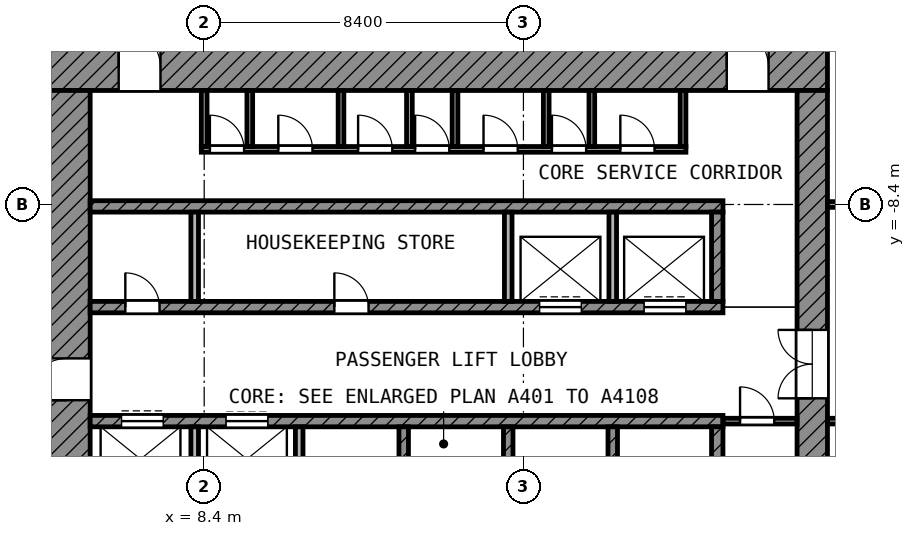
"""IFC4 building model, lengths in metres.
Left out: names, types, materials, properties, quantities, classifications, styles, units other than length and angle.
Written with IfcOpenShell. Run it as: python <this file> out.ifc"""

import sys

from ifc_helpers import new_model, si_unit, direction, frame, frame_2d, origin, place, context, subcontext, project, spatial, rectangle, extrude, element, fill, save


model = new_model("IFC4")
c1 = context("Model", 3, precision=1e-05, world=origin(), true_north=direction((0.0, 1.0)))
c2 = subcontext(c1, "Body", "Model", "MODEL_VIEW")
j1 = project(units=[si_unit("LENGTHUNIT", "METRE"), si_unit("PLANEANGLEUNIT", "RADIAN")], contexts=[c1])
p1 = place(None, origin())
s1 = spatial("IfcSite", under=j1, at=p1, CompositionType="ELEMENT")
p2 = place(p1, origin())
s2 = spatial("IfcBuilding", under=s1, at=p2, CompositionType="ELEMENT")
p3 = place(p2, frame((0.0, 0.0, 260.0)))
s3 = spatial("IfcBuildingStorey", under=s2, at=p3, CompositionType="ELEMENT", Elevation=260.0)
p4 = place(p3, frame((4.2, -4.8, 0.0), z_axis=(0.0, 0.0, 1.0), x_axis=(1.0, 0.0, 0.0)))
e1 = element("IfcWall", 1, at=p4, inside=s3, PredefinedType="SHEAR", context=c2, shape_type="SweptSolid", body=[
    extrude(rectangle(XDim=20.6, YDim=1.2, at=frame_2d((10.3, 0.0))), origin(), (0.0, 0.0, 1.0), 3.6),
])
p5 = place(p4, frame((1.95, 0.0, 0.0)))
e2 = element("IfcOpeningElement", 2, at=p5, cuts=e1, PredefinedType="OPENING", context=c2, shape_type="SweptSolid", body=[
    extrude(rectangle(XDim=1.1, YDim=2.1, at=frame_2d((0.55, 1.05))), frame((0.0, 0.61, 0.0), z_axis=(0.0, -1.0, 0.0), x_axis=(1.0, 0.0, 0.0)), (0.0, 0.0, 1.0), 1.22),
])
p6 = place(p4, frame((17.95, 0.0, 0.0)))
e3 = element("IfcOpeningElement", 3, at=p6, cuts=e1, PredefinedType="OPENING", context=c2, shape_type="SweptSolid", body=[
    extrude(rectangle(XDim=1.1, YDim=2.1, at=frame_2d((0.55, 1.05))), frame((0.0, 0.61, 0.0), z_axis=(0.0, -1.0, 0.0), x_axis=(1.0, 0.0, 0.0)), (0.0, 0.0, 1.0), 1.22),
])
p7 = place(p3, frame((4.8, -24.8, 0.0), z_axis=(0.0, 0.0, 1.0), x_axis=(0.0, 1.0, 0.0)))
e4 = element("IfcWall", 4, at=p7, inside=s3, PredefinedType="SHEAR", context=c2, shape_type="SweptSolid", body=[
    extrude(rectangle(XDim=19.4, YDim=1.2, at=frame_2d((9.7, 0.0))), origin(), (0.0, 0.0, 1.0), 3.6),
])
p8 = place(p7, frame((11.25, 0.0, 0.0)))
e5 = element("IfcOpeningElement", 5, at=p8, cuts=e4, PredefinedType="OPENING", context=c2, shape_type="SweptSolid", body=[
    extrude(rectangle(XDim=1.1, YDim=2.1, at=frame_2d((0.55, 1.05))), frame((0.0, 0.61, 0.0), z_axis=(0.0, -1.0, 0.0), x_axis=(1.0, 0.0, 0.0)), (0.0, 0.0, 1.0), 1.22),
])
p9 = place(p7, frame((1.95, 0.0, 0.0)))
e6 = element("IfcOpeningElement", 6, at=p9, cuts=e4, PredefinedType="OPENING", context=c2, shape_type="SweptSolid", body=[
    extrude(rectangle(XDim=1.1, YDim=2.1, at=frame_2d((0.55, 1.05))), frame((0.0, 0.61, 0.0), z_axis=(0.0, -1.0, 0.0), x_axis=(1.0, 0.0, 0.0)), (0.0, 0.0, 1.0), 1.22),
])
p10 = place(p3, frame((24.4, -24.0, 0.0), z_axis=(0.0, 0.0, 1.0), x_axis=(0.0, 1.0, 0.0)))
e7 = element("IfcWall", 7, at=p10, inside=s3, PredefinedType="SHEAR", context=c2, shape_type="SweptSolid", body=[
    extrude(rectangle(XDim=18.6, YDim=0.8, at=frame_2d((9.3, 0.0))), origin(), (0.0, 0.0, 1.0), 3.6),
])
p11 = place(p10, frame((10.5, 0.0, 0.0)))
e8 = element("IfcOpeningElement", 8, at=p11, cuts=e7, PredefinedType="OPENING", context=c2, shape_type="SweptSolid", body=[
    extrude(rectangle(XDim=1.8, YDim=2.1, at=frame_2d((0.9, 1.05))), frame((0.0, 0.41, 0.0), z_axis=(0.0, -1.0, 0.0), x_axis=(1.0, 0.0, 0.0)), (0.0, 0.0, 1.0), 0.82),
])
p12 = place(p3, frame((5.4, -8.45, 0.0), z_axis=(0.0, 0.0, 1.0), x_axis=(1.0, 0.0, 0.0)))
e9 = element("IfcWall", 9, at=p12, inside=s3, PredefinedType="SHEAR", context=c2, shape_type="SweptSolid", body=[
    extrude(rectangle(XDim=16.65, YDim=0.3, at=frame_2d((8.325, 0.0))), origin(), (0.0, 0.0, 1.0), 3.6),
])
p13 = place(p3, frame((5.4, -11.1, 0.0), z_axis=(0.0, 0.0, 1.0), x_axis=(1.0, 0.0, 0.0)))
e10 = element("IfcWall", 10, at=p13, inside=s3, PredefinedType="SHEAR", context=c2, shape_type="SweptSolid", body=[
    extrude(rectangle(XDim=16.65, YDim=0.3, at=frame_2d((8.325, 0.0))), origin(), (0.0, 0.0, 1.0), 3.6),
])
p14 = place(p13, frame((11.825, 0.0, 0.0)))
e11 = element("IfcOpeningElement", 11, at=p14, cuts=e10, PredefinedType="OPENING", context=c2, shape_type="SweptSolid", body=[
    extrude(rectangle(XDim=1.1, YDim=2.1, at=frame_2d((0.55, 1.05))), frame((0.0, 0.16, 0.0), z_axis=(0.0, -1.0, 0.0), x_axis=(1.0, 0.0, 0.0)), (0.0, 0.0, 1.0), 0.32),
])
p15 = place(p13, frame((14.575, 0.0, 0.0)))
e12 = element("IfcOpeningElement", 12, at=p15, cuts=e10, PredefinedType="OPENING", context=c2, shape_type="SweptSolid", body=[
    extrude(rectangle(XDim=1.1, YDim=2.1, at=frame_2d((0.55, 1.05))), frame((0.0, 0.16, 0.0), z_axis=(0.0, -1.0, 0.0), x_axis=(1.0, 0.0, 0.0)), (0.0, 0.0, 1.0), 0.32),
])
p16 = place(p13, frame((0.925, 0.0, 0.0)))
e13 = element("IfcOpeningElement", 13, at=p16, cuts=e10, PredefinedType="OPENING", context=c2, shape_type="SweptSolid", body=[
    extrude(rectangle(XDim=0.9, YDim=2.1, at=frame_2d((0.45, 1.05))), frame((0.0, 0.16, 0.0), z_axis=(0.0, -1.0, 0.0), x_axis=(1.0, 0.0, 0.0)), (0.0, 0.0, 1.0), 0.32),
])
p17 = place(p13, frame((6.425, 0.0, 0.0)))
e14 = element("IfcOpeningElement", 14, at=p17, cuts=e10, PredefinedType="OPENING", context=c2, shape_type="SweptSolid", body=[
    extrude(rectangle(XDim=0.9, YDim=2.1, at=frame_2d((0.45, 1.05))), frame((0.0, 0.16, 0.0), z_axis=(0.0, -1.0, 0.0), x_axis=(1.0, 0.0, 0.0)), (0.0, 0.0, 1.0), 0.32),
])
p18 = place(p3, frame((5.4, -14.1, 0.0), z_axis=(0.0, 0.0, 1.0), x_axis=(1.0, 0.0, 0.0)))
e15 = element("IfcWall", 15, at=p18, inside=s3, PredefinedType="SHEAR", context=c2, shape_type="SweptSolid", body=[
    extrude(rectangle(XDim=16.65, YDim=0.3, at=frame_2d((8.325, 0.0))), origin(), (0.0, 0.0, 1.0), 3.6),
])
p19 = place(p18, frame((0.825, 0.0, 0.0)))
e16 = element("IfcOpeningElement", 16, at=p19, cuts=e15, PredefinedType="OPENING", context=c2, shape_type="SweptSolid", body=[
    extrude(rectangle(XDim=1.1, YDim=2.1, at=frame_2d((0.55, 1.05))), frame((0.0, 0.16, 0.0), z_axis=(0.0, -1.0, 0.0), x_axis=(1.0, 0.0, 0.0)), (0.0, 0.0, 1.0), 0.32),
])
p20 = place(p18, frame((3.575, 0.0, 0.0)))
e17 = element("IfcOpeningElement", 17, at=p20, cuts=e15, PredefinedType="OPENING", context=c2, shape_type="SweptSolid", body=[
    extrude(rectangle(XDim=1.1, YDim=2.1, at=frame_2d((0.55, 1.05))), frame((0.0, 0.16, 0.0), z_axis=(0.0, -1.0, 0.0), x_axis=(1.0, 0.0, 0.0)), (0.0, 0.0, 1.0), 0.32),
])
p21 = place(p3, frame((21.9, -10.95, 0.0), z_axis=(0.0, 0.0, 1.0), x_axis=(0.0, 1.0, 0.0)))
e18 = element("IfcWall", 18, at=p21, inside=s3, PredefinedType="SHEAR", context=c2, shape_type="SweptSolid", body=[
    extrude(rectangle(XDim=2.35, YDim=0.3, at=frame_2d((1.175, 0.0))), origin(), (0.0, 0.0, 1.0), 3.6),
])
p22 = place(p3, frame((21.9, -16.6, 0.0), z_axis=(0.0, 0.0, 1.0), x_axis=(0.0, 1.0, 0.0)))
e19 = element("IfcWall", 19, at=p22, inside=s3, PredefinedType="SHEAR", context=c2, shape_type="SweptSolid", body=[
    extrude(rectangle(XDim=2.35, YDim=0.3, at=frame_2d((1.175, 0.0))), origin(), (0.0, 0.0, 1.0), 3.6),
])
for number, where, z_axis, x_axis in (
    (20, (8.15, -10.95, 0.0), (0.0, 0.0, 1.0), (0.0, 1.0, 0.0)),
    (21, (16.4, -10.95, 0.0), (0.0, 0.0, 1.0), (0.0, 1.0, 0.0)),
    (22, (19.15, -10.95, 0.0), (0.0, 0.0, 1.0), (0.0, 1.0, 0.0)),
):
    element("IfcWall", number, at=place(p3, frame(where, z_axis=z_axis, x_axis=x_axis)), inside=s3, PredefinedType="PARTITIONING", context=c2, shape_type="SweptSolid", body=[
        extrude(rectangle(XDim=2.35, YDim=0.2, at=frame_2d((1.175, 0.0))), origin(), (0.0, 0.0, 1.0), 3.6),
    ])
for number, where, z_axis, x_axis in (
    (23, (8.15, -16.6, 0.0), (0.0, 0.0, 1.0), (0.0, 1.0, 0.0)),
    (24, (10.9, -16.6, 0.0), (0.0, 0.0, 1.0), (0.0, 1.0, 0.0)),
):
    element("IfcWall", number, at=place(p3, frame(where, z_axis=z_axis, x_axis=x_axis)), inside=s3, PredefinedType="PARTITIONING", context=c2, shape_type="SweptSolid", body=[
        extrude(rectangle(XDim=2.35, YDim=0.2, at=frame_2d((1.175, 0.0))), origin(), (0.0, 0.0, 1.0), 3.6),
    ])
for number, where, z_axis, x_axis in (
    (25, (13.65, -16.6, 0.0), (0.0, 0.0, 1.0), (0.0, 1.0, 0.0)),
    (26, (16.4, -16.6, 0.0), (0.0, 0.0, 1.0), (0.0, 1.0, 0.0)),
    (27, (19.15, -16.6, 0.0), (0.0, 0.0, 1.0), (0.0, 1.0, 0.0)),
):
    element("IfcWall", number, at=place(p3, frame(where, z_axis=z_axis, x_axis=x_axis)), inside=s3, PredefinedType="SHEAR", context=c2, shape_type="SweptSolid", body=[
        extrude(rectangle(XDim=2.35, YDim=0.25, at=frame_2d((1.175, 0.0))), origin(), (0.0, 0.0, 1.0), 3.6),
    ])
p23 = place(p3, frame((22.05, -14.1, 0.0), z_axis=(0.0, 0.0, 1.0), x_axis=(1.0, 0.0, 0.0)))
e28 = element("IfcWall", 28, at=p23, inside=s3, PredefinedType="PARTITIONING", context=c2, shape_type="SweptSolid", body=[
    extrude(rectangle(XDim=1.95, YDim=0.15, at=frame_2d((0.975, 0.0))), origin(), (0.0, 0.0, 1.0), 3.6),
])
p24 = place(p23, frame((0.45, 0.0, 0.0)))
e29 = element("IfcOpeningElement", 29, at=p24, cuts=e28, PredefinedType="OPENING", context=c2, shape_type="SweptSolid", body=[
    extrude(rectangle(XDim=0.9, YDim=2.1, at=frame_2d((0.45, 1.05))), frame((0.0, 0.085, 0.0), z_axis=(0.0, -1.0, 0.0), x_axis=(1.0, 0.0, 0.0)), (0.0, 0.0, 1.0), 0.17),
])
p25 = place(p3, frame((8.325, -6.95, 0.0), z_axis=(0.0, 0.0, 1.0), x_axis=(1.0, 0.0, 0.0)))
e30 = element("IfcWall", 30, at=p25, inside=s3, PredefinedType="PARTITIONING", context=c2, shape_type="SweptSolid", body=[
    extrude(rectangle(XDim=12.75, YDim=0.15, at=frame_2d((6.375, 0.0))), origin(), (0.0, 0.0, 1.0), 3.6),
])
p26 = place(p25, frame((0.225, 0.0, 0.0)))
e31 = element("IfcOpeningElement", 31, at=p26, cuts=e30, PredefinedType="OPENING", context=c2, shape_type="SweptSolid", body=[
    extrude(rectangle(XDim=0.9, YDim=2.1, at=frame_2d((0.45, 1.05))), frame((0.0, 0.085, 0.0), z_axis=(0.0, -1.0, 0.0), x_axis=(1.0, 0.0, 0.0)), (0.0, 0.0, 1.0), 0.17),
])
p27 = place(p25, frame((2.025, 0.0, 0.0)))
e32 = element("IfcOpeningElement", 32, at=p27, cuts=e30, PredefinedType="OPENING", context=c2, shape_type="SweptSolid", body=[
    extrude(rectangle(XDim=0.9, YDim=2.1, at=frame_2d((0.45, 1.05))), frame((0.0, 0.085, 0.0), z_axis=(0.0, -1.0, 0.0), x_axis=(1.0, 0.0, 0.0)), (0.0, 0.0, 1.0), 0.17),
])
p28 = place(p25, frame((4.125, 0.0, 0.0)))
e33 = element("IfcOpeningElement", 33, at=p28, cuts=e30, PredefinedType="OPENING", context=c2, shape_type="SweptSolid", body=[
    extrude(rectangle(XDim=0.9, YDim=2.1, at=frame_2d((0.45, 1.05))), frame((0.0, 0.085, 0.0), z_axis=(0.0, -1.0, 0.0), x_axis=(1.0, 0.0, 0.0)), (0.0, 0.0, 1.0), 0.17),
])
p29 = place(p25, frame((5.625, 0.0, 0.0)))
e34 = element("IfcOpeningElement", 34, at=p29, cuts=e30, PredefinedType="OPENING", context=c2, shape_type="SweptSolid", body=[
    extrude(rectangle(XDim=0.9, YDim=2.1, at=frame_2d((0.45, 1.05))), frame((0.0, 0.085, 0.0), z_axis=(0.0, -1.0, 0.0), x_axis=(1.0, 0.0, 0.0)), (0.0, 0.0, 1.0), 0.17),
])
p30 = place(p25, frame((7.425, 0.0, 0.0)))
e35 = element("IfcOpeningElement", 35, at=p30, cuts=e30, PredefinedType="OPENING", context=c2, shape_type="SweptSolid", body=[
    extrude(rectangle(XDim=0.9, YDim=2.1, at=frame_2d((0.45, 1.05))), frame((0.0, 0.085, 0.0), z_axis=(0.0, -1.0, 0.0), x_axis=(1.0, 0.0, 0.0)), (0.0, 0.0, 1.0), 0.17),
])
p31 = place(p25, frame((9.225, 0.0, 0.0)))
e36 = element("IfcOpeningElement", 36, at=p31, cuts=e30, PredefinedType="OPENING", context=c2, shape_type="SweptSolid", body=[
    extrude(rectangle(XDim=0.9, YDim=2.1, at=frame_2d((0.45, 1.05))), frame((0.0, 0.085, 0.0), z_axis=(0.0, -1.0, 0.0), x_axis=(1.0, 0.0, 0.0)), (0.0, 0.0, 1.0), 0.17),
])
p32 = place(p25, frame((11.025, 0.0, 0.0)))
e37 = element("IfcOpeningElement", 37, at=p32, cuts=e30, PredefinedType="OPENING", context=c2, shape_type="SweptSolid", body=[
    extrude(rectangle(XDim=0.9, YDim=2.1, at=frame_2d((0.45, 1.05))), frame((0.0, 0.085, 0.0), z_axis=(0.0, -1.0, 0.0), x_axis=(1.0, 0.0, 0.0)), (0.0, 0.0, 1.0), 0.17),
])
for number, where, z_axis, x_axis in (
    (38, (8.4, -6.875, 0.0), (0.0, 0.0, 1.0), (0.0, 1.0, 0.0)),
    (39, (9.6, -6.875, 0.0), (0.0, 0.0, 1.0), (0.0, 1.0, 0.0)),
    (40, (12.0, -6.875, 0.0), (0.0, 0.0, 1.0), (0.0, 1.0, 0.0)),
    (41, (13.8, -6.875, 0.0), (0.0, 0.0, 1.0), (0.0, 1.0, 0.0)),
    (42, (15.0, -6.875, 0.0), (0.0, 0.0, 1.0), (0.0, 1.0, 0.0)),
    (43, (17.4, -6.875, 0.0), (0.0, 0.0, 1.0), (0.0, 1.0, 0.0)),
    (44, (18.6, -6.875, 0.0), (0.0, 0.0, 1.0), (0.0, 1.0, 0.0)),
    (45, (21.0, -6.875, 0.0), (0.0, 0.0, 1.0), (0.0, 1.0, 0.0)),
):
    element("IfcWall", number, at=place(p3, frame(where, z_axis=z_axis, x_axis=x_axis)), inside=s3, PredefinedType="PARTITIONING", context=c2, shape_type="SweptSolid", body=[
        extrude(rectangle(XDim=1.475, YDim=0.15, at=frame_2d((0.738, 0.0))), origin(), (0.0, 0.0, 1.0), 3.6),
    ])
p33 = place(p3, frame((24.8, -14.1, 0.0), z_axis=(0.0, 0.0, 1.0), x_axis=(1.0, 0.0, 0.0)))
e46 = element("IfcWall", 46, at=p33, inside=s3, PredefinedType="PARTITIONING", context=c2, shape_type="SweptSolid", body=[
    extrude(rectangle(XDim=4.525, YDim=0.15, at=frame_2d((2.262, 0.0))), origin(), (0.0, 0.0, 1.0), 3.6),
])
p34 = place(p33, frame((1.75, 0.0, 0.0)))
e47 = element("IfcOpeningElement", 47, at=p34, cuts=e46, PredefinedType="OPENING", context=c2, shape_type="SweptSolid", body=[
    extrude(rectangle(XDim=1.5, YDim=2.1, at=frame_2d((0.75, 1.05))), frame((0.0, 0.085, 0.0), z_axis=(0.0, -1.0, 0.0), x_axis=(1.0, 0.0, 0.0)), (0.0, 0.0, 1.0), 0.17),
])
p35 = place(p3, frame((24.8, -8.4, 0.0), z_axis=(0.0, 0.0, 1.0), x_axis=(1.0, 0.0, 0.0)))
e48 = element("IfcWall", 48, at=p35, inside=s3, PredefinedType="PARTITIONING", context=c2, shape_type="SweptSolid", body=[
    extrude(rectangle(XDim=15.432, YDim=0.15, at=frame_2d((7.716, 0.0))), origin(), (0.0, 0.0, 1.0), 3.6),
])
p36 = place(p35, frame((9.3, 0.0, 0.0)))
e49 = element("IfcOpeningElement", 49, at=p36, cuts=e48, PredefinedType="OPENING", context=c2, shape_type="SweptSolid", body=[
    extrude(rectangle(XDim=1.1, YDim=2.1, at=frame_2d((0.55, 1.05))), frame((0.0, 0.085, 0.0), z_axis=(0.0, -1.0, 0.0), x_axis=(1.0, 0.0, 0.0)), (0.0, 0.0, 1.0), 0.17),
])
p37 = place(p35, frame((0.95, 0.0, 0.0)))
e50 = element("IfcOpeningElement", 50, at=p37, cuts=e48, PredefinedType="OPENING", context=c2, shape_type="SweptSolid", body=[
    extrude(rectangle(XDim=1.0, YDim=2.1, at=frame_2d((0.5, 1.05))), frame((0.0, 0.085, 0.0), z_axis=(0.0, -1.0, 0.0), x_axis=(1.0, 0.0, 0.0)), (0.0, 0.0, 1.0), 0.17),
])
p38 = place(p35, frame((5.05, 0.0, 0.0)))
e51 = element("IfcOpeningElement", 51, at=p38, cuts=e48, PredefinedType="OPENING", context=c2, shape_type="SweptSolid", body=[
    extrude(rectangle(XDim=1.2, YDim=2.1, at=frame_2d((0.6, 1.05))), frame((0.0, 0.085, 0.0), z_axis=(0.0, -1.0, 0.0), x_axis=(1.0, 0.0, 0.0)), (0.0, 0.0, 1.0), 0.17),
])
p39 = place(p14, origin())
e52 = element("IfcDoor", 52, at=p39, inside=s3, OperationType="DOUBLE_DOOR_SLIDING", PredefinedType="DOOR", context=c2, shape_type="SweptSolid", body=[
    extrude(rectangle(XDim=1.1, YDim=2.1, at=frame_2d((0.55, 1.05))), frame((0.0, 0.025, 0.0), z_axis=(0.0, -1.0, 0.0), x_axis=(1.0, 0.0, 0.0)), (0.0, 0.0, 1.0), 0.05),
])
fill(e11, e52)
p40 = place(p15, origin())
e53 = element("IfcDoor", 53, at=p40, inside=s3, OperationType="DOUBLE_DOOR_SLIDING", PredefinedType="DOOR", context=c2, shape_type="SweptSolid", body=[
    extrude(rectangle(XDim=1.1, YDim=2.1, at=frame_2d((0.55, 1.05))), frame((0.0, 0.025, 0.0), z_axis=(0.0, -1.0, 0.0), x_axis=(1.0, 0.0, 0.0)), (0.0, 0.0, 1.0), 0.05),
])
fill(e12, e53)
p41 = place(p19, origin())
e54 = element("IfcDoor", 54, at=p41, inside=s3, OperationType="DOUBLE_DOOR_SLIDING", PredefinedType="DOOR", context=c2, shape_type="SweptSolid", body=[
    extrude(rectangle(XDim=1.1, YDim=2.1, at=frame_2d((0.55, 1.05))), frame((0.0, 0.025, 0.0), z_axis=(0.0, -1.0, 0.0), x_axis=(1.0, 0.0, 0.0)), (0.0, 0.0, 1.0), 0.05),
])
fill(e16, e54)
p42 = place(p20, origin())
e55 = element("IfcDoor", 55, at=p42, inside=s3, OperationType="DOUBLE_DOOR_SLIDING", PredefinedType="DOOR", context=c2, shape_type="SweptSolid", body=[
    extrude(rectangle(XDim=1.1, YDim=2.1, at=frame_2d((0.55, 1.05))), frame((0.0, 0.025, 0.0), z_axis=(0.0, -1.0, 0.0), x_axis=(1.0, 0.0, 0.0)), (0.0, 0.0, 1.0), 0.05),
])
fill(e17, e55)
p43 = place(p8, origin())
e56 = element("IfcDoor", 56, at=p43, inside=s3, OperationType="SINGLE_SWING_LEFT", PredefinedType="DOOR", context=c2, shape_type="SweptSolid", body=[
    extrude(rectangle(XDim=1.1, YDim=2.1, at=frame_2d((0.55, 1.05))), frame((0.0, 0.025, 0.0), z_axis=(0.0, -1.0, 0.0), x_axis=(1.0, 0.0, 0.0)), (0.0, 0.0, 1.0), 0.05),
])
fill(e5, e56)
p44 = place(p5, origin())
e57 = element("IfcDoor", 57, at=p44, inside=s3, OperationType="SINGLE_SWING_LEFT", PredefinedType="DOOR", context=c2, shape_type="SweptSolid", body=[
    extrude(rectangle(XDim=1.1, YDim=2.1, at=frame_2d((0.55, 1.05))), frame((0.0, 0.025, 0.0), z_axis=(0.0, -1.0, 0.0), x_axis=(1.0, 0.0, 0.0)), (0.0, 0.0, 1.0), 0.05),
])
fill(e2, e57)
p45 = place(p6, origin())
e58 = element("IfcDoor", 58, at=p45, inside=s3, OperationType="SINGLE_SWING_LEFT", PredefinedType="DOOR", context=c2, shape_type="SweptSolid", body=[
    extrude(rectangle(XDim=1.1, YDim=2.1, at=frame_2d((0.55, 1.05))), frame((0.0, 0.025, 0.0), z_axis=(0.0, -1.0, 0.0), x_axis=(1.0, 0.0, 0.0)), (0.0, 0.0, 1.0), 0.05),
])
fill(e3, e58)
p46 = place(p11, origin())
e59 = element("IfcDoor", 59, at=p46, inside=s3, OperationType="DOUBLE_DOOR_SINGLE_SWING", PredefinedType="DOOR", context=c2, shape_type="SweptSolid", body=[
    extrude(rectangle(XDim=1.8, YDim=2.1, at=frame_2d((0.9, 1.05))), frame((0.0, 0.025, 0.0), z_axis=(0.0, -1.0, 0.0), x_axis=(1.0, 0.0, 0.0)), (0.0, 0.0, 1.0), 0.05),
])
fill(e8, e59)
p47 = place(p26, origin())
e60 = element("IfcDoor", 60, at=p47, inside=s3, OperationType="SINGLE_SWING_LEFT", PredefinedType="DOOR", context=c2, shape_type="SweptSolid", body=[
    extrude(rectangle(XDim=0.9, YDim=2.1, at=frame_2d((0.45, 1.05))), frame((0.0, 0.025, 0.0), z_axis=(0.0, -1.0, 0.0), x_axis=(1.0, 0.0, 0.0)), (0.0, 0.0, 1.0), 0.05),
])
fill(e31, e60)
p48 = place(p27, origin())
e61 = element("IfcDoor", 61, at=p48, inside=s3, OperationType="SINGLE_SWING_LEFT", PredefinedType="DOOR", context=c2, shape_type="SweptSolid", body=[
    extrude(rectangle(XDim=0.9, YDim=2.1, at=frame_2d((0.45, 1.05))), frame((0.0, 0.025, 0.0), z_axis=(0.0, -1.0, 0.0), x_axis=(1.0, 0.0, 0.0)), (0.0, 0.0, 1.0), 0.05),
])
fill(e32, e61)
p49 = place(p28, origin())
e62 = element("IfcDoor", 62, at=p49, inside=s3, OperationType="SINGLE_SWING_LEFT", PredefinedType="DOOR", context=c2, shape_type="SweptSolid", body=[
    extrude(rectangle(XDim=0.9, YDim=2.1, at=frame_2d((0.45, 1.05))), frame((0.0, 0.025, 0.0), z_axis=(0.0, -1.0, 0.0), x_axis=(1.0, 0.0, 0.0)), (0.0, 0.0, 1.0), 0.05),
])
fill(e33, e62)
p50 = place(p29, origin())
e63 = element("IfcDoor", 63, at=p50, inside=s3, OperationType="SINGLE_SWING_LEFT", PredefinedType="DOOR", context=c2, shape_type="SweptSolid", body=[
    extrude(rectangle(XDim=0.9, YDim=2.1, at=frame_2d((0.45, 1.05))), frame((0.0, 0.025, 0.0), z_axis=(0.0, -1.0, 0.0), x_axis=(1.0, 0.0, 0.0)), (0.0, 0.0, 1.0), 0.05),
])
fill(e34, e63)
p51 = place(p30, origin())
e64 = element("IfcDoor", 64, at=p51, inside=s3, OperationType="SINGLE_SWING_LEFT", PredefinedType="DOOR", context=c2, shape_type="SweptSolid", body=[
    extrude(rectangle(XDim=0.9, YDim=2.1, at=frame_2d((0.45, 1.05))), frame((0.0, 0.025, 0.0), z_axis=(0.0, -1.0, 0.0), x_axis=(1.0, 0.0, 0.0)), (0.0, 0.0, 1.0), 0.05),
])
fill(e35, e64)
p52 = place(p31, origin())
e65 = element("IfcDoor", 65, at=p52, inside=s3, OperationType="SINGLE_SWING_LEFT", PredefinedType="DOOR", context=c2, shape_type="SweptSolid", body=[
    extrude(rectangle(XDim=0.9, YDim=2.1, at=frame_2d((0.45, 1.05))), frame((0.0, 0.025, 0.0), z_axis=(0.0, -1.0, 0.0), x_axis=(1.0, 0.0, 0.0)), (0.0, 0.0, 1.0), 0.05),
])
fill(e36, e65)
p53 = place(p32, origin())
e66 = element("IfcDoor", 66, at=p53, inside=s3, OperationType="SINGLE_SWING_LEFT", PredefinedType="DOOR", context=c2, shape_type="SweptSolid", body=[
    extrude(rectangle(XDim=0.9, YDim=2.1, at=frame_2d((0.45, 1.05))), frame((0.0, 0.025, 0.0), z_axis=(0.0, -1.0, 0.0), x_axis=(1.0, 0.0, 0.0)), (0.0, 0.0, 1.0), 0.05),
])
fill(e37, e66)
p54 = place(p24, origin())
e67 = element("IfcDoor", 67, at=p54, inside=s3, OperationType="SINGLE_SWING_LEFT", PredefinedType="DOOR", context=c2, shape_type="SweptSolid", body=[
    extrude(rectangle(XDim=0.9, YDim=2.1, at=frame_2d((0.45, 1.05))), frame((0.0, 0.025, 0.0), z_axis=(0.0, -1.0, 0.0), x_axis=(1.0, 0.0, 0.0)), (0.0, 0.0, 1.0), 0.05),
])
fill(e29, e67)
p55 = place(p16, origin())
e68 = element("IfcDoor", 68, at=p55, inside=s3, OperationType="SINGLE_SWING_LEFT", PredefinedType="DOOR", context=c2, shape_type="SweptSolid", body=[
    extrude(rectangle(XDim=0.9, YDim=2.1, at=frame_2d((0.45, 1.05))), frame((0.0, 0.025, 0.0), z_axis=(0.0, -1.0, 0.0), x_axis=(1.0, 0.0, 0.0)), (0.0, 0.0, 1.0), 0.05),
])
fill(e13, e68)
p56 = place(p17, origin())
e69 = element("IfcDoor", 69, at=p56, inside=s3, OperationType="SINGLE_SWING_LEFT", PredefinedType="DOOR", context=c2, shape_type="SweptSolid", body=[
    extrude(rectangle(XDim=0.9, YDim=2.1, at=frame_2d((0.45, 1.05))), frame((0.0, 0.025, 0.0), z_axis=(0.0, -1.0, 0.0), x_axis=(1.0, 0.0, 0.0)), (0.0, 0.0, 1.0), 0.05),
])
fill(e14, e69)
save(model, sys.argv[1])
